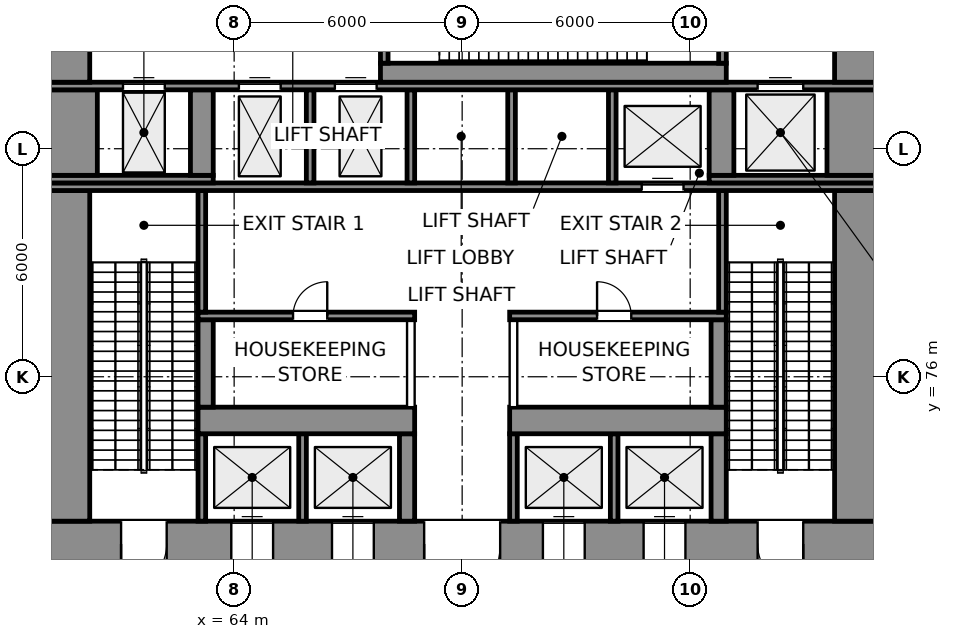
"""IFC4 building model, lengths in metres.
Left out: names, types, materials, properties, quantities, classifications, styles, units other than length and angle.
Written with IfcOpenShell. Run it as: python <this file> out.ifc"""

import sys

from ifc_helpers import new_model, si_unit, direction, frame, frame_2d, origin, place, context, subcontext, project, spatial, rectangle, extrude, element, fill, save


model = new_model("IFC4")
c1 = context("Model", 3, precision=1e-05, world=origin(), true_north=direction((0.0, 1.0)))
c2 = subcontext(c1, "Body", "Model", "MODEL_VIEW")
j1 = project(units=[si_unit("LENGTHUNIT", "METRE"), si_unit("PLANEANGLEUNIT", "RADIAN")], contexts=[c1])
p1 = place(None, origin())
s1 = spatial("IfcSite", under=j1, at=p1, CompositionType="ELEMENT")
p2 = place(p1, origin())
s2 = spatial("IfcBuilding", under=s1, at=p2, CompositionType="ELEMENT")
p3 = place(p2, frame((0.0, 0.0, 15.0)))
s3 = spatial("IfcBuildingStorey", under=s2, at=p3, CompositionType="ELEMENT", Elevation=15.0)
p4 = place(p3, frame((59.0, 71.6, 0.0), z_axis=(0.0, 0.0, 1.0), x_axis=(1.0, 0.0, 0.0)))
e1 = element("IfcWall", 1, at=p4, inside=s3, PredefinedType="SHEAR", context=c2, shape_type="SweptSolid", body=[
    extrude(rectangle(XDim=22.0, YDim=1.2, at=frame_2d((11.0, 0.0))), origin(), (0.0, 0.0, 1.0), 8.0),
])
p5 = place(p4, frame((2.025, 0.0, 0.0)))
e2 = element("IfcOpeningElement", 2, at=p5, cuts=e1, PredefinedType="OPENING", context=c2, shape_type="SweptSolid", body=[
    extrude(rectangle(XDim=1.2, YDim=2.1, at=frame_2d((0.6, 1.05))), frame((0.0, 0.61, 0.0), z_axis=(0.0, -1.0, 0.0), x_axis=(1.0, 0.0, 0.0)), (0.0, 0.0, 1.0), 1.22),
])
p6 = place(p4, frame((18.775, 0.0, 0.0)))
e3 = element("IfcOpeningElement", 3, at=p6, cuts=e1, PredefinedType="OPENING", context=c2, shape_type="SweptSolid", body=[
    extrude(rectangle(XDim=1.2, YDim=2.1, at=frame_2d((0.6, 1.05))), frame((0.0, 0.61, 0.0), z_axis=(0.0, -1.0, 0.0), x_axis=(1.0, 0.0, 0.0)), (0.0, 0.0, 1.0), 1.22),
])
p7 = place(p4, frame((10.0, 0.0, 0.0)))
e4 = element("IfcOpeningElement", 4, at=p7, cuts=e1, PredefinedType="OPENING", context=c2, shape_type="SweptSolid", body=[
    extrude(rectangle(XDim=2.0, YDim=2.1, at=frame_2d((1.0, 1.05))), frame((0.0, 0.61, 0.0), z_axis=(0.0, -1.0, 0.0), x_axis=(1.0, 0.0, 0.0)), (0.0, 0.0, 1.0), 1.22),
])
p8 = place(p4, frame((4.925, 0.0, 0.0)))
e5 = element("IfcOpeningElement", 5, at=p8, cuts=e1, PredefinedType="OPENING", context=c2, shape_type="SweptSolid", body=[
    extrude(rectangle(XDim=1.1, YDim=2.1, at=frame_2d((0.55, 1.05))), frame((0.0, 0.61, 0.0), z_axis=(0.0, -1.0, 0.0), x_axis=(1.0, 0.0, 0.0)), (0.0, 0.0, 1.0), 1.22),
])
p9 = place(p4, frame((7.575, 0.0, 0.0)))
e6 = element("IfcOpeningElement", 6, at=p9, cuts=e1, PredefinedType="OPENING", context=c2, shape_type="SweptSolid", body=[
    extrude(rectangle(XDim=1.1, YDim=2.1, at=frame_2d((0.55, 1.05))), frame((0.0, 0.61, 0.0), z_axis=(0.0, -1.0, 0.0), x_axis=(1.0, 0.0, 0.0)), (0.0, 0.0, 1.0), 1.22),
])
p10 = place(p4, frame((13.125, 0.0, 0.0)))
e7 = element("IfcOpeningElement", 7, at=p10, cuts=e1, PredefinedType="OPENING", context=c2, shape_type="SweptSolid", body=[
    extrude(rectangle(XDim=1.1, YDim=2.1, at=frame_2d((0.55, 1.05))), frame((0.0, 0.61, 0.0), z_axis=(0.0, -1.0, 0.0), x_axis=(1.0, 0.0, 0.0)), (0.0, 0.0, 1.0), 1.22),
])
p11 = place(p4, frame((15.775, 0.0, 0.0)))
e8 = element("IfcOpeningElement", 8, at=p11, cuts=e1, PredefinedType="OPENING", context=c2, shape_type="SweptSolid", body=[
    extrude(rectangle(XDim=1.1, YDim=2.1, at=frame_2d((0.55, 1.05))), frame((0.0, 0.61, 0.0), z_axis=(0.0, -1.0, 0.0), x_axis=(1.0, 0.0, 0.0)), (0.0, 0.0, 1.0), 1.22),
])
p12 = place(p3, frame((59.6, 72.2, 0.0), z_axis=(0.0, 0.0, 1.0), x_axis=(0.0, 1.0, 0.0)))
e9 = element("IfcWall", 9, at=p12, inside=s3, PredefinedType="SHEAR", context=c2, shape_type="SweptSolid", body=[
    extrude(rectangle(XDim=8.7, YDim=1.2, at=frame_2d((4.35, 0.0))), origin(), (0.0, 0.0, 1.0), 8.0),
])
for number, where, z_axis, x_axis in (
    (10, (63.15, 72.2, 0.0), (0.0, 0.0, 1.0), (0.0, 1.0, 0.0)),
    (11, (65.8, 72.2, 0.0), (0.0, 0.0, 1.0), (0.0, 1.0, 0.0)),
):
    element("IfcWall", number, at=place(p3, frame(where, z_axis=z_axis, x_axis=x_axis)), inside=s3, PredefinedType="SHEAR", context=c2, shape_type="SweptSolid", body=[
        extrude(rectangle(XDim=2.3, YDim=0.2, at=frame_2d((1.15, 0.0))), origin(), (0.0, 0.0, 1.0), 8.0),
    ])
p13 = place(p3, frame((68.55, 72.2, 0.0), z_axis=(0.0, 0.0, 1.0), x_axis=(0.0, 1.0, 0.0)))
e12 = element("IfcWall", 12, at=p13, inside=s3, PredefinedType="SHEAR", context=c2, shape_type="SweptSolid", body=[
    extrude(rectangle(XDim=2.3, YDim=0.4, at=frame_2d((1.15, 0.0))), origin(), (0.0, 0.0, 1.0), 8.0),
])
for number, where, z_axis, x_axis in (
    (13, (71.35, 72.2, 0.0), (0.0, 0.0, 1.0), (0.0, 1.0, 0.0)),
    (14, (74.0, 72.2, 0.0), (0.0, 0.0, 1.0), (0.0, 1.0, 0.0)),
):
    element("IfcWall", number, at=place(p3, frame(where, z_axis=z_axis, x_axis=x_axis)), inside=s3, PredefinedType="SHEAR", context=c2, shape_type="SweptSolid", body=[
        extrude(rectangle(XDim=2.3, YDim=0.2, at=frame_2d((1.15, 0.0))), origin(), (0.0, 0.0, 1.0), 8.0),
    ])
p14 = place(p3, frame((76.75, 72.2, 0.0), z_axis=(0.0, 0.0, 1.0), x_axis=(0.0, 1.0, 0.0)))
e15 = element("IfcWall", 15, at=p14, inside=s3, PredefinedType="SHEAR", context=c2, shape_type="SweptSolid", body=[
    extrude(rectangle(XDim=2.3, YDim=0.4, at=frame_2d((1.15, 0.0))), origin(), (0.0, 0.0, 1.0), 8.0),
])
p15 = place(p3, frame((80.4, 72.2, 0.0), z_axis=(0.0, 0.0, 1.0), x_axis=(0.0, 1.0, 0.0)))
e16 = element("IfcWall", 16, at=p15, inside=s3, PredefinedType="SHEAR", context=c2, shape_type="SweptSolid", body=[
    extrude(rectangle(XDim=8.7, YDim=1.2, at=frame_2d((4.35, 0.0))), origin(), (0.0, 0.0, 1.0), 8.0),
])
for number, where, z_axis, x_axis in (
    (17, (63.05, 74.85, 0.0), (0.0, 0.0, 1.0), (1.0, 0.0, 0.0)),
    (18, (71.25, 74.85, 0.0), (0.0, 0.0, 1.0), (1.0, 0.0, 0.0)),
):
    element("IfcWall", number, at=place(p3, frame(where, z_axis=z_axis, x_axis=x_axis)), inside=s3, PredefinedType="SHEAR", context=c2, shape_type="SweptSolid", body=[
        extrude(rectangle(XDim=5.7, YDim=0.7, at=frame_2d((2.85, 0.0))), origin(), (0.0, 0.0, 1.0), 8.0),
    ])
p16 = place(p3, frame((63.25, 75.2, 0.0), z_axis=(0.0, 0.0, 1.0), x_axis=(0.0, 1.0, 0.0)))
e19 = element("IfcWall", 19, at=p16, inside=s3, PredefinedType="SHEAR", context=c2, shape_type="SweptSolid", body=[
    extrude(rectangle(XDim=2.3, YDim=0.4, at=frame_2d((1.15, 0.0))), origin(), (0.0, 0.0, 1.0), 8.0),
])
for number, where, z_axis, x_axis in (
    (20, (68.65, 75.2, 0.0), (0.0, 0.0, 1.0), (0.0, 1.0, 0.0)),
    (21, (71.35, 75.2, 0.0), (0.0, 0.0, 1.0), (0.0, 1.0, 0.0)),
):
    element("IfcWall", number, at=place(p3, frame(where, z_axis=z_axis, x_axis=x_axis)), inside=s3, PredefinedType="PARTITIONING", context=c2, shape_type="SweptSolid", body=[
        extrude(rectangle(XDim=2.3, YDim=0.2, at=frame_2d((1.15, 0.0))), origin(), (0.0, 0.0, 1.0), 7.65),
    ])
p17 = place(p3, frame((76.75, 75.2, 0.0), z_axis=(0.0, 0.0, 1.0), x_axis=(0.0, 1.0, 0.0)))
e22 = element("IfcWall", 22, at=p17, inside=s3, PredefinedType="SHEAR", context=c2, shape_type="SweptSolid", body=[
    extrude(rectangle(XDim=2.3, YDim=0.4, at=frame_2d((1.15, 0.0))), origin(), (0.0, 0.0, 1.0), 8.0),
])
p18 = place(p3, frame((63.05, 77.6, 0.0), z_axis=(0.0, 0.0, 1.0), x_axis=(1.0, 0.0, 0.0)))
e23 = element("IfcWall", 23, at=p18, inside=s3, PredefinedType="SHEAR", context=c2, shape_type="SweptSolid", body=[
    extrude(rectangle(XDim=5.7, YDim=0.2, at=frame_2d((2.85, 0.0))), origin(), (0.0, 0.0, 1.0), 8.0),
])
p19 = place(p18, frame((2.5, 0.0, 0.0)))
e24 = element("IfcOpeningElement", 24, at=p19, cuts=e23, PredefinedType="OPENING", context=c2, shape_type="SweptSolid", body=[
    extrude(rectangle(XDim=0.9, YDim=2.1, at=frame_2d((0.45, 1.05))), frame((0.0, 0.11, 0.0), z_axis=(0.0, -1.0, 0.0), x_axis=(1.0, 0.0, 0.0)), (0.0, 0.0, 1.0), 0.22),
])
p20 = place(p3, frame((71.25, 77.6, 0.0), z_axis=(0.0, 0.0, 1.0), x_axis=(1.0, 0.0, 0.0)))
e25 = element("IfcWall", 25, at=p20, inside=s3, PredefinedType="SHEAR", context=c2, shape_type="SweptSolid", body=[
    extrude(rectangle(XDim=5.7, YDim=0.2, at=frame_2d((2.85, 0.0))), origin(), (0.0, 0.0, 1.0), 8.0),
])
p21 = place(p20, frame((2.3, 0.0, 0.0)))
e26 = element("IfcOpeningElement", 26, at=p21, cuts=e25, PredefinedType="OPENING", context=c2, shape_type="SweptSolid", body=[
    extrude(rectangle(XDim=0.9, YDim=2.1, at=frame_2d((0.45, 1.05))), frame((0.0, 0.11, 0.0), z_axis=(0.0, -1.0, 0.0), x_axis=(1.0, 0.0, 0.0)), (0.0, 0.0, 1.0), 0.22),
])
for number, where, z_axis, x_axis in (
    (27, (63.15, 77.7, 0.0), (0.0, 0.0, 1.0), (0.0, 1.0, 0.0)),
    (28, (76.85, 77.7, 0.0), (0.0, 0.0, 1.0), (0.0, 1.0, 0.0)),
):
    element("IfcWall", number, at=place(p3, frame(where, z_axis=z_axis, x_axis=x_axis)), inside=s3, PredefinedType="SHEAR", context=c2, shape_type="SweptSolid", body=[
        extrude(rectangle(XDim=3.2, YDim=0.2, at=frame_2d((1.6, 0.0))), origin(), (0.0, 0.0, 1.0), 8.0),
    ])
p22 = place(p3, frame((59.0, 81.0, 0.0), z_axis=(0.0, 0.0, 1.0), x_axis=(1.0, 0.0, 0.0)))
e29 = element("IfcWall", 29, at=p22, inside=s3, PredefinedType="SHEAR", context=c2, shape_type="SweptSolid", body=[
    extrude(rectangle(XDim=22.0, YDim=0.2, at=frame_2d((11.0, 0.0))), origin(), (0.0, 0.0, 1.0), 8.0),
])
p23 = place(p22, frame((15.725, 0.0, 0.0)))
e30 = element("IfcOpeningElement", 30, at=p23, cuts=e29, PredefinedType="OPENING", context=c2, shape_type="SweptSolid", body=[
    extrude(rectangle(XDim=1.1, YDim=2.1, at=frame_2d((0.55, 1.05))), frame((0.0, 0.11, 0.0), z_axis=(0.0, -1.0, 0.0), x_axis=(1.0, 0.0, 0.0)), (0.0, 0.0, 1.0), 0.22),
])
p24 = place(p3, frame((59.0, 81.2, 0.0), z_axis=(0.0, 0.0, 1.0), x_axis=(1.0, 0.0, 0.0)))
e31 = element("IfcWall", 31, at=p24, inside=s3, PredefinedType="SHEAR", context=c2, shape_type="SweptSolid", body=[
    extrude(rectangle(XDim=4.45, YDim=0.2, at=frame_2d((2.225, 0.0))), origin(), (0.0, 0.0, 1.0), 8.0),
])
for number, where, z_axis, x_axis in (
    (32, (66.0, 81.1, 0.0), (0.0, 0.0, 1.0), (0.0, 1.0, 0.0)),
    (33, (68.65, 81.1, 0.0), (0.0, 0.0, 1.0), (0.0, 1.0, 0.0)),
    (34, (71.3, 81.1, 0.0), (0.0, 0.0, 1.0), (0.0, 1.0, 0.0)),
    (35, (73.95, 81.1, 0.0), (0.0, 0.0, 1.0), (0.0, 1.0, 0.0)),
):
    element("IfcWall", number, at=place(p3, frame(where, z_axis=z_axis, x_axis=x_axis)), inside=s3, PredefinedType="SHEAR", context=c2, shape_type="SweptSolid", body=[
        extrude(rectangle(XDim=2.45, YDim=0.2, at=frame_2d((1.225, 0.0))), origin(), (0.0, 0.0, 1.0), 8.0),
    ])
p25 = place(p3, frame((76.5, 81.2, 0.0), z_axis=(0.0, 0.0, 1.0), x_axis=(1.0, 0.0, 0.0)))
e36 = element("IfcWall", 36, at=p25, inside=s3, PredefinedType="SHEAR", context=c2, shape_type="SweptSolid", body=[
    extrude(rectangle(XDim=4.5, YDim=0.2, at=frame_2d((2.25, 0.0))), origin(), (0.0, 0.0, 1.0), 8.0),
])
p26 = place(p3, frame((59.7, 81.3, 0.0), z_axis=(0.0, 0.0, 1.0), x_axis=(0.0, 1.0, 0.0)))
e37 = element("IfcWall", 37, at=p26, inside=s3, PredefinedType="SHEAR", context=c2, shape_type="SweptSolid", body=[
    extrude(rectangle(XDim=2.25, YDim=1.4, at=frame_2d((1.125, 0.0))), origin(), (0.0, 0.0, 1.0), 8.0),
])
p27 = place(p3, frame((63.15, 81.3, 0.0), z_axis=(0.0, 0.0, 1.0), x_axis=(0.0, 1.0, 0.0)))
e38 = element("IfcWall", 38, at=p27, inside=s3, PredefinedType="SHEAR", context=c2, shape_type="SweptSolid", body=[
    extrude(rectangle(XDim=2.25, YDim=0.6, at=frame_2d((1.125, 0.0))), origin(), (0.0, 0.0, 1.0), 8.0),
])
p28 = place(p3, frame((76.825, 81.3, 0.0), z_axis=(0.0, 0.0, 1.0), x_axis=(0.0, 1.0, 0.0)))
e39 = element("IfcWall", 39, at=p28, inside=s3, PredefinedType="SHEAR", context=c2, shape_type="SweptSolid", body=[
    extrude(rectangle(XDim=2.25, YDim=0.65, at=frame_2d((1.125, 0.0))), origin(), (0.0, 0.0, 1.0), 8.0),
])
p29 = place(p3, frame((80.3, 81.3, 0.0), z_axis=(0.0, 0.0, 1.0), x_axis=(0.0, 1.0, 0.0)))
e40 = element("IfcWall", 40, at=p29, inside=s3, PredefinedType="SHEAR", context=c2, shape_type="SweptSolid", body=[
    extrude(rectangle(XDim=2.25, YDim=1.4, at=frame_2d((1.125, 0.0))), origin(), (0.0, 0.0, 1.0), 8.0),
])
p30 = place(p3, frame((59.0, 83.65, 0.0), z_axis=(0.0, 0.0, 1.0), x_axis=(1.0, 0.0, 0.0)))
e41 = element("IfcWall", 41, at=p30, inside=s3, PredefinedType="SHEAR", context=c2, shape_type="SweptSolid", body=[
    extrude(rectangle(XDim=22.0, YDim=0.2, at=frame_2d((11.0, 0.0))), origin(), (0.0, 0.0, 1.0), 8.0),
])
p31 = place(p30, frame((5.125, 0.0, 0.0)))
e42 = element("IfcOpeningElement", 42, at=p31, cuts=e41, PredefinedType="OPENING", context=c2, shape_type="SweptSolid", body=[
    extrude(rectangle(XDim=1.1, YDim=2.1, at=frame_2d((0.55, 1.05))), frame((0.0, 0.11, 0.0), z_axis=(0.0, -1.0, 0.0), x_axis=(1.0, 0.0, 0.0)), (0.0, 0.0, 1.0), 0.22),
])
p32 = place(p30, frame((7.65, 0.0, 0.0)))
e43 = element("IfcOpeningElement", 43, at=p32, cuts=e41, PredefinedType="OPENING", context=c2, shape_type="SweptSolid", body=[
    extrude(rectangle(XDim=1.1, YDim=2.1, at=frame_2d((0.55, 1.05))), frame((0.0, 0.11, 0.0), z_axis=(0.0, -1.0, 0.0), x_axis=(1.0, 0.0, 0.0)), (0.0, 0.0, 1.0), 0.22),
])
p33 = place(p30, frame((18.775, 0.0, 0.0)))
e44 = element("IfcOpeningElement", 44, at=p33, cuts=e41, PredefinedType="OPENING", context=c2, shape_type="SweptSolid", body=[
    extrude(rectangle(XDim=1.2, YDim=2.1, at=frame_2d((0.6, 1.05))), frame((0.0, 0.11, 0.0), z_axis=(0.0, -1.0, 0.0), x_axis=(1.0, 0.0, 0.0)), (0.0, 0.0, 1.0), 0.22),
])
p34 = place(p30, frame((2.075, 0.0, 0.0)))
e45 = element("IfcOpeningElement", 45, at=p34, cuts=e41, PredefinedType="OPENING", context=c2, shape_type="SweptSolid", body=[
    extrude(rectangle(XDim=1.1, YDim=2.1, at=frame_2d((0.55, 1.05))), frame((0.0, 0.11, 0.0), z_axis=(0.0, -1.0, 0.0), x_axis=(1.0, 0.0, 0.0)), (0.0, 0.0, 1.0), 0.22),
])
p35 = place(p3, frame((59.6, 83.75, 0.0), z_axis=(0.0, 0.0, 1.0), x_axis=(0.0, 1.0, 0.0)))
e46 = element("IfcWall", 46, at=p35, inside=s3, PredefinedType="SHEAR", context=c2, shape_type="SweptSolid", body=[
    extrude(rectangle(XDim=3.05, YDim=1.2, at=frame_2d((1.525, 0.0))), origin(), (0.0, 0.0, 1.0), 8.0),
])
p36 = place(p35, frame((0.975, 0.0, 0.0)))
e47 = element("IfcOpeningElement", 47, at=p36, cuts=e46, PredefinedType="OPENING", context=c2, shape_type="SweptSolid", body=[
    extrude(rectangle(XDim=1.1, YDim=2.1, at=frame_2d((0.55, 1.05))), frame((0.0, 0.61, 0.0), z_axis=(0.0, -1.0, 0.0), x_axis=(1.0, 0.0, 0.0)), (0.0, 0.0, 1.0), 1.22),
])
p37 = place(p3, frame((67.85, 84.0, 0.0), z_axis=(0.0, 0.0, 1.0), x_axis=(1.0, 0.0, 0.0)))
e48 = element("IfcWall", 48, at=p37, inside=s3, PredefinedType="SHEAR", context=c2, shape_type="SweptSolid", body=[
    extrude(rectangle(XDim=9.1, YDim=0.5, at=frame_2d((4.55, 0.0))), origin(), (0.0, 0.0, 1.0), 8.0),
])
p38 = place(p3, frame((80.4, 83.75, 0.0), z_axis=(0.0, 0.0, 1.0), x_axis=(0.0, 1.0, 0.0)))
e49 = element("IfcWall", 49, at=p38, inside=s3, PredefinedType="SHEAR", context=c2, shape_type="SweptSolid", body=[
    extrude(rectangle(XDim=3.05, YDim=1.2, at=frame_2d((1.525, 0.0))), origin(), (0.0, 0.0, 1.0), 8.0),
])
p39 = place(p38, frame((0.925, 0.0, 0.0)))
e50 = element("IfcOpeningElement", 50, at=p39, cuts=e49, PredefinedType="OPENING", context=c2, shape_type="SweptSolid", body=[
    extrude(rectangle(XDim=1.2, YDim=2.1, at=frame_2d((0.6, 1.05))), frame((0.0, 0.61, 0.0), z_axis=(0.0, -1.0, 0.0), x_axis=(1.0, 0.0, 0.0)), (0.0, 0.0, 1.0), 1.22),
])
p40 = place(p3, frame((67.95, 84.25, 0.0), z_axis=(0.0, 0.0, 1.0), x_axis=(0.0, 1.0, 0.0)))
e51 = element("IfcWall", 51, at=p40, inside=s3, PredefinedType="SHEAR", context=c2, shape_type="SweptSolid", body=[
    extrude(rectangle(XDim=2.55, YDim=0.2, at=frame_2d((1.275, 0.0))), origin(), (0.0, 0.0, 1.0), 8.0),
])
p41 = place(p40, frame((0.825, 0.0, 0.0)))
e52 = element("IfcOpeningElement", 52, at=p41, cuts=e51, PredefinedType="OPENING", context=c2, shape_type="SweptSolid", body=[
    extrude(rectangle(XDim=1.2, YDim=2.1, at=frame_2d((0.6, 1.05))), frame((0.0, 0.11, 0.0), z_axis=(0.0, -1.0, 0.0), x_axis=(1.0, 0.0, 0.0)), (0.0, 0.0, 1.0), 0.22),
])
p42 = place(p3, frame((76.85, 84.25, 0.0), z_axis=(0.0, 0.0, 1.0), x_axis=(0.0, 1.0, 0.0)))
e53 = element("IfcWall", 53, at=p42, inside=s3, PredefinedType="SHEAR", context=c2, shape_type="SweptSolid", body=[
    extrude(rectangle(XDim=2.55, YDim=0.2, at=frame_2d((1.275, 0.0))), origin(), (0.0, 0.0, 1.0), 8.0),
])
p43 = place(p5, frame((1.2, 0.0, 0.0), z_axis=(0.0, 0.0, 1.0), x_axis=(-1.0, 0.0, 0.0)))
e54 = element("IfcDoor", 54, at=p43, inside=s3, OperationType="SINGLE_SWING_RIGHT", PredefinedType="DOOR", context=c2, shape_type="SweptSolid", body=[
    extrude(rectangle(XDim=1.2, YDim=2.1, at=frame_2d((0.6, 1.05))), frame((0.0, 0.025, 0.0), z_axis=(0.0, -1.0, 0.0), x_axis=(1.0, 0.0, 0.0)), (0.0, 0.0, 1.0), 0.05),
])
fill(e2, e54)
p44 = place(p6, frame((1.2, 0.0, 0.0), z_axis=(0.0, 0.0, 1.0), x_axis=(-1.0, 0.0, 0.0)))
e55 = element("IfcDoor", 55, at=p44, inside=s3, OperationType="SINGLE_SWING_LEFT", PredefinedType="DOOR", context=c2, shape_type="SweptSolid", body=[
    extrude(rectangle(XDim=1.2, YDim=2.1, at=frame_2d((0.6, 1.05))), frame((0.0, 0.025, 0.0), z_axis=(0.0, -1.0, 0.0), x_axis=(1.0, 0.0, 0.0)), (0.0, 0.0, 1.0), 0.05),
])
fill(e3, e55)
p45 = place(p7, frame((2.0, 0.0, 0.0), z_axis=(0.0, 0.0, 1.0), x_axis=(-1.0, 0.0, 0.0)))
e56 = element("IfcDoor", 56, at=p45, inside=s3, OperationType="DOUBLE_DOOR_SINGLE_SWING", PredefinedType="DOOR", context=c2, shape_type="SweptSolid", body=[
    extrude(rectangle(XDim=2.0, YDim=2.1, at=frame_2d((1.0, 1.05))), frame((0.0, 0.025, 0.0), z_axis=(0.0, -1.0, 0.0), x_axis=(1.0, 0.0, 0.0)), (0.0, 0.0, 1.0), 0.05),
])
fill(e4, e56)
p46 = place(p31, origin())
e57 = element("IfcDoor", 57, at=p46, inside=s3, OperationType="DOUBLE_DOOR_SLIDING", PredefinedType="DOOR", context=c2, shape_type="SweptSolid", body=[
    extrude(rectangle(XDim=1.1, YDim=2.1, at=frame_2d((0.55, 1.05))), frame((0.0, 0.025, 0.0), z_axis=(0.0, -1.0, 0.0), x_axis=(1.0, 0.0, 0.0)), (0.0, 0.0, 1.0), 0.05),
])
fill(e42, e57)
p47 = place(p32, origin())
e58 = element("IfcDoor", 58, at=p47, inside=s3, OperationType="DOUBLE_DOOR_SLIDING", PredefinedType="DOOR", context=c2, shape_type="SweptSolid", body=[
    extrude(rectangle(XDim=1.1, YDim=2.1, at=frame_2d((0.55, 1.05))), frame((0.0, 0.025, 0.0), z_axis=(0.0, -1.0, 0.0), x_axis=(1.0, 0.0, 0.0)), (0.0, 0.0, 1.0), 0.05),
])
fill(e43, e58)
p48 = place(p23, origin())
e59 = element("IfcDoor", 59, at=p48, inside=s3, OperationType="DOUBLE_DOOR_SLIDING", PredefinedType="DOOR", context=c2, shape_type="SweptSolid", body=[
    extrude(rectangle(XDim=1.1, YDim=2.1, at=frame_2d((0.55, 1.05))), frame((0.0, 0.025, 0.0), z_axis=(0.0, -1.0, 0.0), x_axis=(1.0, 0.0, 0.0)), (0.0, 0.0, 1.0), 0.05),
])
fill(e30, e59)
p49 = place(p8, origin())
e60 = element("IfcDoor", 60, at=p49, inside=s3, OperationType="DOUBLE_DOOR_SLIDING", PredefinedType="DOOR", context=c2, shape_type="SweptSolid", body=[
    extrude(rectangle(XDim=1.1, YDim=2.1, at=frame_2d((0.55, 1.05))), frame((0.0, 0.025, 0.0), z_axis=(0.0, -1.0, 0.0), x_axis=(1.0, 0.0, 0.0)), (0.0, 0.0, 1.0), 0.05),
])
fill(e5, e60)
p50 = place(p9, origin())
e61 = element("IfcDoor", 61, at=p50, inside=s3, OperationType="DOUBLE_DOOR_SLIDING", PredefinedType="DOOR", context=c2, shape_type="SweptSolid", body=[
    extrude(rectangle(XDim=1.1, YDim=2.1, at=frame_2d((0.55, 1.05))), frame((0.0, 0.025, 0.0), z_axis=(0.0, -1.0, 0.0), x_axis=(1.0, 0.0, 0.0)), (0.0, 0.0, 1.0), 0.05),
])
fill(e6, e61)
p51 = place(p10, origin())
e62 = element("IfcDoor", 62, at=p51, inside=s3, OperationType="DOUBLE_DOOR_SLIDING", PredefinedType="DOOR", context=c2, shape_type="SweptSolid", body=[
    extrude(rectangle(XDim=1.1, YDim=2.1, at=frame_2d((0.55, 1.05))), frame((0.0, 0.025, 0.0), z_axis=(0.0, -1.0, 0.0), x_axis=(1.0, 0.0, 0.0)), (0.0, 0.0, 1.0), 0.05),
])
fill(e7, e62)
p52 = place(p11, origin())
e63 = element("IfcDoor", 63, at=p52, inside=s3, OperationType="DOUBLE_DOOR_SLIDING", PredefinedType="DOOR", context=c2, shape_type="SweptSolid", body=[
    extrude(rectangle(XDim=1.1, YDim=2.1, at=frame_2d((0.55, 1.05))), frame((0.0, 0.025, 0.0), z_axis=(0.0, -1.0, 0.0), x_axis=(1.0, 0.0, 0.0)), (0.0, 0.0, 1.0), 0.05),
])
fill(e8, e63)
p53 = place(p33, origin())
e64 = element("IfcDoor", 64, at=p53, inside=s3, OperationType="DOUBLE_DOOR_SLIDING", PredefinedType="DOOR", context=c2, shape_type="SweptSolid", body=[
    extrude(rectangle(XDim=1.2, YDim=2.1, at=frame_2d((0.6, 1.05))), frame((0.0, 0.025, 0.0), z_axis=(0.0, -1.0, 0.0), x_axis=(1.0, 0.0, 0.0)), (0.0, 0.0, 1.0), 0.05),
])
fill(e44, e64)
p54 = place(p34, origin())
e65 = element("IfcDoor", 65, at=p54, inside=s3, OperationType="DOUBLE_DOOR_SLIDING", PredefinedType="DOOR", context=c2, shape_type="SweptSolid", body=[
    extrude(rectangle(XDim=1.1, YDim=2.1, at=frame_2d((0.55, 1.05))), frame((0.0, 0.025, 0.0), z_axis=(0.0, -1.0, 0.0), x_axis=(1.0, 0.0, 0.0)), (0.0, 0.0, 1.0), 0.05),
])
fill(e45, e65)
p55 = place(p19, origin())
e66 = element("IfcDoor", 66, at=p55, inside=s3, OperationType="SINGLE_SWING_RIGHT", PredefinedType="DOOR", context=c2, shape_type="SweptSolid", body=[
    extrude(rectangle(XDim=0.9, YDim=2.1, at=frame_2d((0.45, 1.05))), frame((0.0, 0.025, 0.0), z_axis=(0.0, -1.0, 0.0), x_axis=(1.0, 0.0, 0.0)), (0.0, 0.0, 1.0), 0.05),
])
fill(e24, e66)
p56 = place(p21, origin())
e67 = element("IfcDoor", 67, at=p56, inside=s3, OperationType="SINGLE_SWING_LEFT", PredefinedType="DOOR", context=c2, shape_type="SweptSolid", body=[
    extrude(rectangle(XDim=0.9, YDim=2.1, at=frame_2d((0.45, 1.05))), frame((0.0, 0.025, 0.0), z_axis=(0.0, -1.0, 0.0), x_axis=(1.0, 0.0, 0.0)), (0.0, 0.0, 1.0), 0.05),
])
fill(e26, e67)
save(model, sys.argv[1])
